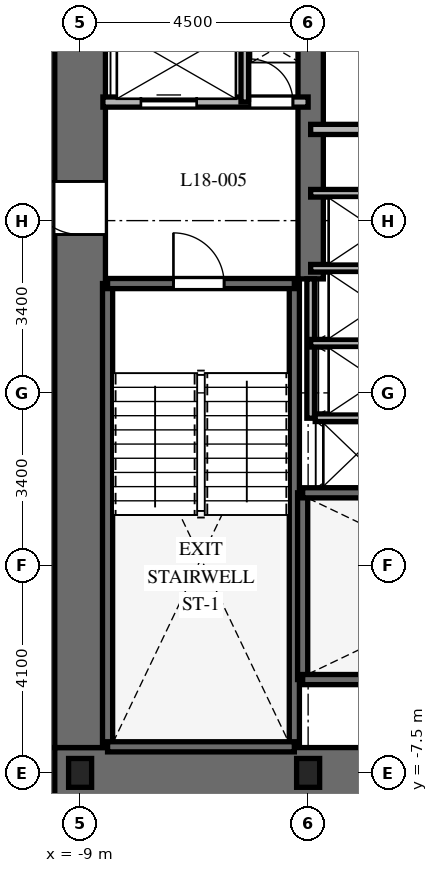
"""IFC4 building model, lengths in metres.
Left out: names, types, materials, properties, quantities, classifications, styles, units other than length and angle.
Written with IfcOpenShell. Run it as: python <this file> out.ifc"""

import sys

from ifc_helpers import new_model, si_unit, direction, frame, frame_2d, origin, origin_2d, place, context, subcontext, project, spatial, rectangle, i_section, extrude, element, fill, save


model = new_model("IFC4")
c1 = context("Model", 3, precision=1e-05, world=origin(), true_north=direction((0.0, 1.0)))
c2 = subcontext(c1, "Body", "Model", "MODEL_VIEW")
j1 = project(units=[si_unit("LENGTHUNIT", "METRE"), si_unit("PLANEANGLEUNIT", "RADIAN")], contexts=[c1])
p1 = place(None, origin())
s1 = spatial("IfcSite", under=j1, at=p1, CompositionType="ELEMENT")
p2 = place(p1, origin())
s2 = spatial("IfcBuilding", under=s1, at=p2, CompositionType="ELEMENT")
p3 = place(p2, frame((0.0, 0.0, 78.6)))
s3 = spatial("IfcBuildingStorey", under=s2, at=p3, CompositionType="ELEMENT", Elevation=78.6)
p4 = place(p3, frame((-9.5, -7.5, 0.0), z_axis=(0.0, 0.0, 1.0), x_axis=(1.0, 0.0, 0.0)))
e1 = element("IfcWall", 1, at=p4, inside=s3, PredefinedType="SHEAR", context=c2, shape_type="SweptSolid", body=[
    extrude(rectangle(XDim=19.0, YDim=1.0, at=frame_2d((9.5, 0.0))), origin(), (0.0, 0.0, 1.0), 3.7),
])
p5 = place(p4, frame((9.55, 0.0, 0.0)))
e2 = element("IfcOpeningElement", 2, at=p5, cuts=e1, PredefinedType="OPENING", context=c2, shape_type="SweptSolid", body=[
    extrude(rectangle(XDim=1.0, YDim=2.15, at=frame_2d((0.5, 1.075))), frame((0.0, 0.51, 0.0), z_axis=(0.0, -1.0, 0.0), x_axis=(1.0, 0.0, 0.0)), (0.0, 0.0, 1.0), 1.02),
])
p6 = place(p3, frame((-9.0, -7.0, 0.0), z_axis=(0.0, 0.0, 1.0), x_axis=(0.0, 1.0, 0.0)))
e3 = element("IfcWall", 3, at=p6, inside=s3, PredefinedType="SHEAR", context=c2, shape_type="SweptSolid", body=[
    extrude(rectangle(XDim=14.0, YDim=1.0, at=frame_2d((7.0, 0.0))), origin(), (0.0, 0.0, 1.0), 3.7),
])
p7 = place(p6, frame((10.125, 0.0, 0.0)))
e4 = element("IfcOpeningElement", 4, at=p7, cuts=e3, PredefinedType="OPENING", context=c2, shape_type="SweptSolid", body=[
    extrude(rectangle(XDim=1.05, YDim=2.15, at=frame_2d((0.525, 1.075))), frame((0.0, 0.51, 0.0), z_axis=(0.0, -1.0, 0.0), x_axis=(1.0, 0.0, 0.0)), (0.0, 0.0, 1.0), 1.02),
])
p8 = place(p3, frame((-4.45, 2.25, 0.0), z_axis=(0.0, 0.0, 1.0), x_axis=(0.0, 1.0, 0.0)))
e5 = element("IfcWall", 5, at=p8, inside=s3, PredefinedType="SHEAR", context=c2, shape_type="SweptSolid", body=[
    extrude(rectangle(XDim=4.75, YDim=0.5, at=frame_2d((2.375, 0.0))), origin(), (0.0, 0.0, 1.0), 3.7),
])
for number, where, z_axis, x_axis in (
    (6, (-8.458, -6.985, 0.0), (0.0, 0.0, 1.0), (0.0, 1.0, 0.0)),
    (7, (-4.772, -6.985, 0.0), (0.0, 0.0, 1.0), (0.0, 1.0, 0.0)),
):
    element("IfcWall", number, at=place(p3, frame(where, z_axis=z_axis, x_axis=x_axis)), inside=s3, PredefinedType="SHEAR", context=c2, shape_type="SweptSolid", body=[
        extrude(rectangle(XDim=9.143, YDim=0.2, at=frame_2d((4.572, 0.0))), origin(), (0.0, 0.0, 1.0), 3.7),
    ])
p9 = place(p3, frame((-8.458, -6.985, 0.0), z_axis=(0.0, 0.0, 1.0), x_axis=(1.0, 0.0, 0.0)))
e8 = element("IfcWall", 8, at=p9, inside=s3, PredefinedType="SHEAR", context=c2, shape_type="SweptSolid", body=[
    extrude(rectangle(XDim=3.686, YDim=0.2, at=frame_2d((1.843, 0.0))), origin(), (0.0, 0.0, 1.0), 3.7),
])
p10 = place(p3, frame((-8.458, 2.158, 0.0), z_axis=(0.0, 0.0, 1.0), x_axis=(1.0, 0.0, 0.0)))
e9 = element("IfcWall", 9, at=p10, inside=s3, PredefinedType="SHEAR", context=c2, shape_type="SweptSolid", body=[
    extrude(rectangle(XDim=3.686, YDim=0.2, at=frame_2d((1.843, 0.0))), origin(), (0.0, 0.0, 1.0), 3.7),
])
p11 = place(p10, frame((1.3, 0.0, 0.0)))
e10 = element("IfcOpeningElement", 10, at=p11, cuts=e9, PredefinedType="OPENING", context=c2, shape_type="SweptSolid", body=[
    extrude(rectangle(XDim=1.0, YDim=2.15, at=frame_2d((0.5, 1.075))), frame((0.0, 0.11, 0.0), z_axis=(0.0, -1.0, 0.0), x_axis=(1.0, 0.0, 0.0)), (0.0, 0.0, 1.0), 0.22),
])
p12 = place(p3, frame((-4.608, -5.658, 0.0), z_axis=(0.0, 0.0, 1.0), x_axis=(0.0, 1.0, 0.0)))
e11 = element("IfcWall", 11, at=p12, inside=s3, PredefinedType="SHEAR", context=c2, shape_type="SweptSolid", body=[
    extrude(rectangle(XDim=3.686, YDim=0.2, at=frame_2d((1.843, 0.0))), origin(), (0.0, 0.0, 1.0), 3.7),
])
p13 = place(p3, frame((-4.608, -5.658, 0.0), z_axis=(0.0, 0.0, 1.0), x_axis=(1.0, 0.0, 0.0)))
e12 = element("IfcWall", 12, at=p13, inside=s3, PredefinedType="SHEAR", context=c2, shape_type="SweptSolid", body=[
    extrude(rectangle(XDim=9.166, YDim=0.2, at=frame_2d((4.583, 0.0))), origin(), (0.0, 0.0, 1.0), 3.7),
])
p14 = place(p13, frame((7.45, 0.0, 0.0)))
e13 = element("IfcOpeningElement", 13, at=p14, cuts=e12, PredefinedType="OPENING", context=c2, shape_type="SweptSolid", body=[
    extrude(rectangle(XDim=1.0, YDim=2.15, at=frame_2d((0.5, 1.075))), frame((0.0, 0.11, 0.0), z_axis=(0.0, -1.0, 0.0), x_axis=(1.0, 0.0, 0.0)), (0.0, 0.0, 1.0), 0.22),
])
p15 = place(p3, frame((-4.608, -1.972, 0.0), z_axis=(0.0, 0.0, 1.0), x_axis=(1.0, 0.0, 0.0)))
e14 = element("IfcWall", 14, at=p15, inside=s3, PredefinedType="SHEAR", context=c2, shape_type="SweptSolid", body=[
    extrude(rectangle(XDim=9.166, YDim=0.2, at=frame_2d((4.583, 0.0))), origin(), (0.0, 0.0, 1.0), 3.7),
])
for number, where, z_axis, x_axis in (
    (15, (-9.0, -7.5, 0.0), (0.0, 0.0, 1.0), (1.0, 0.0, 0.0)),
    (16, (-4.5, -7.5, 0.0), (0.0, 0.0, 1.0), (1.0, 0.0, 0.0)),
):
    element("IfcColumn", number, at=place(p3, frame(where, z_axis=z_axis, x_axis=x_axis)), inside=s3, PredefinedType="COLUMN", context=c2, shape_type="SweptSolid", body=[
        extrude(i_section(OverallWidth=0.454, OverallDepth=0.569, WebThickness=0.078, FlangeThickness=0.125, at=origin_2d()), origin(), (0.0, 0.0, 1.0), 3.7),
    ])
p16 = place(p3, frame((-8.55, 5.74, 0.0), z_axis=(0.0, 0.0, 1.0), x_axis=(1.0, 0.0, 0.0)))
e17 = element("IfcWall", 17, at=p16, inside=s3, PredefinedType="PARTITIONING", context=c2, shape_type="SweptSolid", body=[
    extrude(rectangle(XDim=4.05, YDim=0.2, at=frame_2d((2.025, 0.0))), origin(), (0.0, 0.0, 1.0), 3.4),
])
p17 = place(p16, frame((0.75, 0.0, 0.0)))
e18 = element("IfcOpeningElement", 18, at=p17, cuts=e17, PredefinedType="OPENING", context=c2, shape_type="SweptSolid", body=[
    extrude(rectangle(XDim=1.1, YDim=2.2, at=frame_2d((0.55, 1.1))), frame((0.0, 0.11, 0.0), z_axis=(0.0, -1.0, 0.0), x_axis=(1.0, 0.0, 0.0)), (0.0, 0.0, 1.0), 0.22),
])
p18 = place(p16, frame((2.9, 0.0, 0.0)))
e19 = element("IfcOpeningElement", 19, at=p18, cuts=e17, PredefinedType="OPENING", context=c2, shape_type="SweptSolid", body=[
    extrude(rectangle(XDim=0.85, YDim=2.03, at=frame_2d((0.425, 1.015))), frame((0.0, 0.11, 0.0), z_axis=(0.0, -1.0, 0.0), x_axis=(1.0, 0.0, 0.0)), (0.0, 0.0, 1.0), 0.22),
])
p19 = place(p3, frame((-5.75, 5.74, 0.0), z_axis=(0.0, 0.0, 1.0), x_axis=(0.0, 1.0, 0.0)))
e20 = element("IfcWall", 20, at=p19, inside=s3, PredefinedType="PARTITIONING", context=c2, shape_type="SweptSolid", body=[
    extrude(rectangle(XDim=1.41, YDim=0.15, at=frame_2d((0.705, 0.0))), origin(), (0.0, 0.0, 1.0), 3.4),
])
p20 = place(p3, frame((-4.45, 5.2, 0.0), z_axis=(0.0, 0.0, 1.0), x_axis=(1.0, 0.0, 0.0)))
e21 = element("IfcWall", 21, at=p20, inside=s3, PredefinedType="PARTITIONING", context=c2, shape_type="SweptSolid", body=[
    extrude(rectangle(XDim=4.5, YDim=0.2, at=frame_2d((2.25, 0.0))), origin(), (0.0, 0.0, 1.0), 3.4),
])
p21 = place(p3, frame((-4.45, -0.5, 0.0), z_axis=(0.0, 0.0, 1.0), x_axis=(0.0, 1.0, 0.0)))
e22 = element("IfcWall", 22, at=p21, inside=s3, PredefinedType="PARTITIONING", context=c2, shape_type="SweptSolid", body=[
    extrude(rectangle(XDim=2.75, YDim=0.15, at=frame_2d((1.375, 0.0))), origin(), (0.0, 0.0, 1.0), 3.4),
])
for number, where, z_axis, x_axis in (
    (23, (-4.45, 3.94, 0.0), (0.0, 0.0, 1.0), (1.0, 0.0, 0.0)),
    (24, (-4.45, 0.98, 0.0), (0.0, 0.0, 1.0), (1.0, 0.0, 0.0)),
    (25, (-4.45, 2.46, 0.0), (0.0, 0.0, 1.0), (1.0, 0.0, 0.0)),
):
    element("IfcWall", number, at=place(p3, frame(where, z_axis=z_axis, x_axis=x_axis)), inside=s3, PredefinedType="PARTITIONING", context=c2, shape_type="SweptSolid", body=[
        extrude(rectangle(XDim=2.55, YDim=0.15, at=frame_2d((1.275, 0.0))), origin(), (0.0, 0.0, 1.0), 3.4),
    ])
p22 = place(p3, frame((-4.36, -0.49, 0.0), z_axis=(0.0, 0.0, 1.0), x_axis=(1.0, 0.0, 0.0)))
e26 = element("IfcWall", 26, at=p22, inside=s3, PredefinedType="PARTITIONING", context=c2, shape_type="SweptSolid", body=[
    extrude(rectangle(XDim=8.72, YDim=0.15, at=frame_2d((4.36, 0.0))), origin(), (0.0, 0.0, 1.0), 3.4),
])
p23 = place(p22, frame((3.16, 0.0, 0.0)))
e27 = element("IfcOpeningElement", 27, at=p23, cuts=e26, PredefinedType="OPENING", context=c2, shape_type="SweptSolid", body=[
    extrude(rectangle(XDim=0.85, YDim=2.03, at=frame_2d((0.425, 1.015))), frame((0.0, 0.085, 0.0), z_axis=(0.0, -1.0, 0.0), x_axis=(1.0, 0.0, 0.0)), (0.0, 0.0, 1.0), 0.17),
])
p24 = place(p22, frame((5.21, 0.0, 0.0)))
e28 = element("IfcOpeningElement", 28, at=p24, cuts=e26, PredefinedType="OPENING", context=c2, shape_type="SweptSolid", body=[
    extrude(rectangle(XDim=0.85, YDim=2.03, at=frame_2d((0.425, 1.015))), frame((0.0, 0.085, 0.0), z_axis=(0.0, -1.0, 0.0), x_axis=(1.0, 0.0, 0.0)), (0.0, 0.0, 1.0), 0.17),
])
p25 = place(p11, origin())
e29 = element("IfcDoor", 29, at=p25, inside=s3, OperationType="SINGLE_SWING_LEFT", PredefinedType="DOOR", context=c2, shape_type="SweptSolid", body=[
    extrude(rectangle(XDim=1.0, YDim=2.15, at=frame_2d((0.5, 1.075))), frame((0.0, 0.025, 0.0), z_axis=(0.0, -1.0, 0.0), x_axis=(1.0, 0.0, 0.0)), (0.0, 0.0, 1.0), 0.05),
])
fill(e10, e29)
p26 = place(p7, origin())
e30 = element("IfcDoor", 30, at=p26, inside=s3, OperationType="SINGLE_SWING_RIGHT", PredefinedType="DOOR", context=c2, shape_type="SweptSolid", body=[
    extrude(rectangle(XDim=1.05, YDim=2.15, at=frame_2d((0.525, 1.075))), frame((0.0, 0.025, 0.0), z_axis=(0.0, -1.0, 0.0), x_axis=(1.0, 0.0, 0.0)), (0.0, 0.0, 1.0), 0.05),
])
fill(e4, e30)
p27 = place(p17, origin())
e31 = element("IfcDoor", 31, at=p27, inside=s3, OperationType="SLIDING_TO_LEFT", PredefinedType="DOOR", context=c2, shape_type="SweptSolid", body=[
    extrude(rectangle(XDim=1.1, YDim=2.2, at=frame_2d((0.55, 1.1))), frame((0.0, 0.025, 0.0), z_axis=(0.0, -1.0, 0.0), x_axis=(1.0, 0.0, 0.0)), (0.0, 0.0, 1.0), 0.05),
])
fill(e18, e31)
p28 = place(p18, origin())
e32 = element("IfcDoor", 32, at=p28, inside=s3, OperationType="SINGLE_SWING_LEFT", PredefinedType="DOOR", context=c2, shape_type="SweptSolid", body=[
    extrude(rectangle(XDim=0.85, YDim=2.03, at=frame_2d((0.425, 1.015))), frame((0.0, 0.025, 0.0), z_axis=(0.0, -1.0, 0.0), x_axis=(1.0, 0.0, 0.0)), (0.0, 0.0, 1.0), 0.05),
])
fill(e19, e32)
save(model, sys.argv[1])
